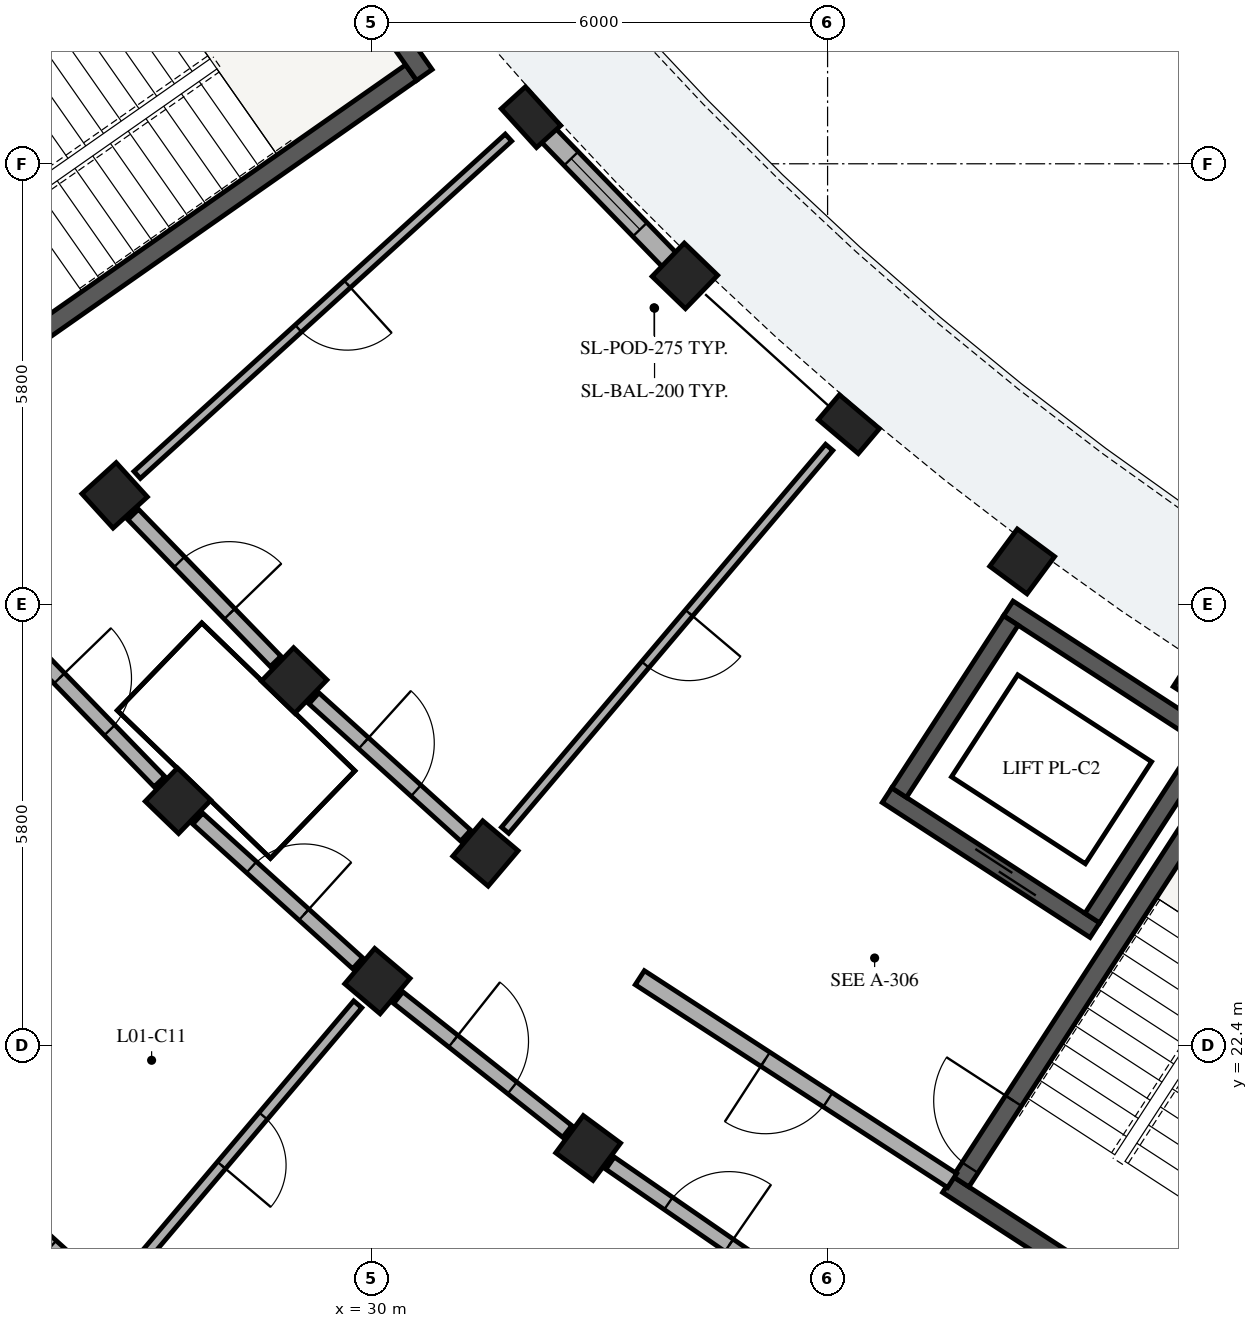
"""IFC4 building model, lengths in metres.
Left out: names, types, materials, properties, quantities, classifications, styles, units other than length and angle.
Written with IfcOpenShell. Run it as: python <this file> out.ifc"""

import sys

from ifc_helpers import new_model, si_unit, direction, frame, frame_2d, origin, origin_2d, place, context, subcontext, project, spatial, rectangle, extrude, element, fill, save


model = new_model("IFC4")
c1 = context("Model", 3, precision=1e-05, world=origin(), true_north=direction((0.0, 1.0)))
c2 = subcontext(c1, "Body", "Model", "MODEL_VIEW")
j1 = project(units=[si_unit("LENGTHUNIT", "METRE"), si_unit("PLANEANGLEUNIT", "RADIAN")], contexts=[c1])
p1 = place(None, origin())
s1 = spatial("IfcSite", under=j1, at=p1, CompositionType="ELEMENT")
p2 = place(p1, origin())
s2 = spatial("IfcBuilding", under=s1, at=p2, CompositionType="ELEMENT")
p3 = place(p2, frame((0.0, 0.0, 4.76)))
s3 = spatial("IfcBuildingStorey", under=s2, at=p3, CompositionType="ELEMENT", Elevation=4.76)
p4 = place(p3, frame((25.114, 31.414, 0.0), z_axis=(0.0, 0.0, 1.0), x_axis=(0.819141541656, 0.573591435374, 0.0)))
e1 = element("IfcWall", 1, at=p4, inside=s3, PredefinedType="SHEAR", context=c2, shape_type="SweptSolid", body=[
    extrude(rectangle(XDim=6.6, YDim=0.25, at=frame_2d((3.3, 0.0))), origin(), (0.0, 0.0, 1.0), 3.83),
])
p5 = place(p3, frame((30.695, 35.169, 0.0), z_axis=(0.0, 0.0, 1.0), x_axis=(-0.573582112484, 0.819148069789, 0.0)))
e2 = element("IfcWall", 2, at=p5, inside=s3, PredefinedType="SHEAR", context=c2, shape_type="SweptSolid", body=[
    extrude(rectangle(XDim=3.42, YDim=0.25, at=frame_2d((1.71, 0.0))), origin(), (0.0, 0.0, 1.0), 3.83),
])
p6 = place(p3, frame((23.296, 34.01, 0.0), z_axis=(0.0, 0.0, 1.0), x_axis=(0.819153711596, 0.573574055182, 0.0)))
e3 = element("IfcWall", 3, at=p6, inside=s3, PredefinedType="SHEAR", context=c2, shape_type="SweptSolid", body=[
    extrude(rectangle(XDim=6.6, YDim=0.25, at=frame_2d((3.3, 0.0))), origin(), (0.0, 0.0, 1.0), 3.83),
])
p7 = place(p6, frame((0.22, 0.0, 0.0)))
e4 = element("IfcOpeningElement", 4, at=p7, cuts=e3, PredefinedType="OPENING", context=c2, shape_type="SweptSolid", body=[
    extrude(rectangle(XDim=1.05, YDim=2.15, at=frame_2d((0.525, 1.075))), frame((0.0, 0.135, 0.0), z_axis=(0.0, -1.0, 0.0), x_axis=(1.0, 0.0, 0.0)), (0.0, 0.0, 1.0), 0.27),
])
p8 = place(p3, frame((40.413, 18.882, 0.0), z_axis=(0.0, 0.0, 1.0), x_axis=(0.544629435258, 0.838676802022, 0.0)))
e5 = element("IfcWall", 5, at=p8, inside=s3, PredefinedType="SHEAR", context=c2, shape_type="SweptSolid", body=[
    extrude(rectangle(XDim=6.6, YDim=0.25, at=frame_2d((3.3, 0.0))), origin(), (0.0, 0.0, 1.0), 3.83),
])
p9 = place(p3, frame((40.449, 18.709, 0.0), z_axis=(0.0, 0.0, 1.0), x_axis=(-0.838678407117, 0.544626963559, 0.0)))
e6 = element("IfcWall", 6, at=p9, inside=s3, PredefinedType="SHEAR", context=c2, shape_type="SweptSolid", body=[
    extrude(rectangle(XDim=3.42, YDim=0.25, at=frame_2d((1.71, 0.0))), origin(), (0.0, 0.0, 1.0), 3.83),
])
p10 = place(p3, frame((37.754, 20.608, 0.0), z_axis=(0.0, 0.0, 1.0), x_axis=(0.544655453679, 0.838659905312, 0.0)))
e7 = element("IfcWall", 7, at=p10, inside=s3, PredefinedType="SHEAR", context=c2, shape_type="SweptSolid", body=[
    extrude(rectangle(XDim=6.6, YDim=0.25, at=frame_2d((3.3, 0.0))), origin(), (0.0, 0.0, 1.0), 3.83),
])
p11 = place(p10, frame((0.22, 0.0, 0.0)))
e8 = element("IfcOpeningElement", 8, at=p11, cuts=e7, PredefinedType="OPENING", context=c2, shape_type="SweptSolid", body=[
    extrude(rectangle(XDim=1.05, YDim=2.15, at=frame_2d((0.525, 1.075))), frame((0.0, 0.135, 0.0), z_axis=(0.0, -1.0, 0.0), x_axis=(1.0, 0.0, 0.0)), (0.0, 0.0, 1.0), 0.27),
])
p12 = place(p3, frame((39.516, 23.917, 0.0), z_axis=(0.0, 0.0, 1.0), x_axis=(-0.838660840752, 0.544654013286, 0.0)))
e9 = element("IfcWall", 9, at=p12, inside=s3, PredefinedType="SHEAR", context=c2, shape_type="SweptSolid", body=[
    extrude(rectangle(XDim=3.26, YDim=0.23, at=frame_2d((1.63, 0.0))), origin(), (0.0, 0.0, 1.0), 3.83),
])
p13 = place(p12, frame((0.9, 0.0, 0.0)))
e10 = element("IfcOpeningElement", 10, at=p13, cuts=e9, PredefinedType="OPENING", context=c2, shape_type="SweptSolid", body=[
    extrude(rectangle(XDim=1.0, YDim=2.15, at=frame_2d((0.5, 1.075))), frame((0.0, 0.125, 0.0), z_axis=(0.0, -1.0, 0.0), x_axis=(1.0, 0.0, 0.0)), (0.0, 0.0, 1.0), 0.25),
])
p14 = place(p3, frame((41.112, 26.375, 0.0), z_axis=(0.0, 0.0, 1.0), x_axis=(-0.838638623546, 0.544688221919, 0.0)))
e11 = element("IfcWall", 11, at=p14, inside=s3, PredefinedType="SHEAR", context=c2, shape_type="SweptSolid", body=[
    extrude(rectangle(XDim=3.26, YDim=0.23, at=frame_2d((1.63, 0.0))), origin(), (0.0, 0.0, 1.0), 3.83),
])
p15 = place(p3, frame((39.482, 24.077, 0.0), z_axis=(0.0, 0.0, 1.0), x_axis=(0.544686387605, 0.838639814913, 0.0)))
e12 = element("IfcWall", 12, at=p15, inside=s3, PredefinedType="SHEAR", context=c2, shape_type="SweptSolid", body=[
    extrude(rectangle(XDim=2.7, YDim=0.23, at=frame_2d((1.35, 0.0))), origin(), (0.0, 0.0, 1.0), 3.83),
])
p16 = place(p3, frame((36.941, 25.727, 0.0), z_axis=(0.0, 0.0, 1.0), x_axis=(0.544622789439, 0.838681117722, 0.0)))
e13 = element("IfcWall", 13, at=p16, inside=s3, PredefinedType="SHEAR", context=c2, shape_type="SweptSolid", body=[
    extrude(rectangle(XDim=2.7, YDim=0.23, at=frame_2d((1.35, 0.0))), origin(), (0.0, 0.0, 1.0), 3.83),
])
p17 = place(p3, frame((32.097, 34.613, 0.0), z_axis=(0.0, 0.0, 1.0), x_axis=(-0.740218127487, -0.672366807435, 0.0)))
e14 = element("IfcColumn", 14, at=p17, inside=s3, PredefinedType="PILASTER", context=c2, shape_type="SweptSolid", body=[
    extrude(rectangle(XDim=0.43, YDim=0.69, at=origin_2d()), origin(), (0.0, 0.0, 1.0), 3.825),
])
for number, where, z_axis, x_axis in (
    (15, (26.62, 29.638, 0.0), (0.0, 0.0, 1.0), (-0.74, -0.672, 0.0)),
    (16, (34.122, 32.525, 0.0), (0.0, 0.0, 1.0), (-0.695, -0.719, 0.0)),
    (17, (28.982, 27.202, 0.0), (0.0, 0.0, 1.0), (-0.695, -0.719, 0.0)),
    (18, (27.454, 25.62, 0.0), (0.0, 0.0, 1.0), (-0.695, -0.719, 0.0)),
):
    element("IfcColumn", number, at=place(p3, frame(where, z_axis=z_axis, x_axis=x_axis)), inside=s3, PredefinedType="COLUMN", context=c2, shape_type="SweptSolid", body=[
        extrude(rectangle(XDim=0.61, YDim=0.61, at=origin_2d()), origin(), (0.0, 0.0, 1.0), 3.825),
    ])
p18 = place(p3, frame((36.28, 30.574, 0.0), z_axis=(0.0, 0.0, 1.0), x_axis=(-0.646123979643, -0.763232469783, 0.0)))
e19 = element("IfcColumn", 19, at=p18, inside=s3, PredefinedType="PILASTER", context=c2, shape_type="SweptSolid", body=[
    extrude(rectangle(XDim=0.43, YDim=0.69, at=origin_2d()), origin(), (0.0, 0.0, 1.0), 3.825),
])
for number, where, z_axis, x_axis in (
    (20, (31.499, 24.927, 0.0), (0.0, 0.0, 1.0), (-0.646, -0.763, 0.0)),
    (21, (30.077, 23.247, 0.0), (0.0, 0.0, 1.0), (-0.646, -0.763, 0.0)),
    (22, (38.56, 28.769, 0.0), (0.0, 0.0, 1.0), (-0.595, -0.804, 0.0)),
    (23, (32.85, 21.052, 0.0), (0.0, 0.0, 1.0), (-0.595, -0.804, 0.0)),
):
    element("IfcColumn", number, at=place(p3, frame(where, z_axis=z_axis, x_axis=x_axis)), inside=s3, PredefinedType="COLUMN", context=c2, shape_type="SweptSolid", body=[
        extrude(rectangle(XDim=0.61, YDim=0.61, at=origin_2d()), origin(), (0.0, 0.0, 1.0), 3.825),
    ])
p19 = place(p3, frame((40.954, 27.116, 0.0), z_axis=(0.0, 0.0, 1.0), x_axis=(-0.540974471368, -0.841039012964, 0.0)))
e24 = element("IfcColumn", 24, at=p19, inside=s3, PredefinedType="PILASTER", context=c2, shape_type="SweptSolid", body=[
    extrude(rectangle(XDim=0.43, YDim=0.69, at=origin_2d()), origin(), (0.0, 0.0, 1.0), 3.825),
])
p20 = place(p3, frame((32.226, 34.48, 0.0), z_axis=(0.0, 0.0, 1.0), x_axis=(0.696206559645, -0.717841505004, 0.0)))
e25 = element("IfcWall", 25, at=p20, inside=s3, PredefinedType="SOLIDWALL", context=c2, shape_type="SweptSolid", body=[
    extrude(rectangle(XDim=2.449, YDim=0.26, at=frame_2d((1.224, 0.0))), origin(), (0.0, 0.0, 1.0), 3.075),
])
p21 = place(p20, frame((0.574, 0.0, 0.55)))
e26 = element("IfcOpeningElement", 26, at=p21, cuts=e25, PredefinedType="OPENING", context=c2, shape_type="SweptSolid", body=[
    extrude(rectangle(XDim=1.3, YDim=1.6, at=frame_2d((0.65, 0.8))), frame((0.0, 0.14, 0.0), z_axis=(0.0, -1.0, 0.0), x_axis=(1.0, 0.0, 0.0)), (0.0, 0.0, 1.0), 0.28),
])
p22 = place(p3, frame((23.837, 21.479, 0.0), z_axis=(0.0, 0.0, 1.0), x_axis=(0.741699000924, -0.670732876806, 0.0)))
e27 = element("IfcWall", 27, at=p22, inside=s3, PredefinedType="SOLIDWALL", context=c2, shape_type="SweptSolid", body=[
    extrude(rectangle(XDim=3.437, YDim=0.26, at=frame_2d((1.718, 0.0))), origin(), (0.0, 0.0, 1.0), 3.075),
])
p23 = place(p22, frame((0.838, 0.0, 0.55)))
e28 = element("IfcOpeningElement", 28, at=p23, cuts=e27, PredefinedType="OPENING", context=c2, shape_type="SweptSolid", body=[
    extrude(rectangle(XDim=1.76, YDim=1.635, at=frame_2d((0.88, 0.817))), frame((0.0, 0.14, 0.0), z_axis=(0.0, -1.0, 0.0), x_axis=(1.0, 0.0, 0.0)), (0.0, 0.0, 1.0), 0.28),
])
p24 = place(p3, frame((37.639, 20.623, 0.0), z_axis=(0.0, 0.0, 1.0), x_axis=(-0.838681446513, 0.544622283124, 0.0)))
e29 = element("IfcWall", 29, at=p24, inside=s3, PredefinedType="PARTITIONING", context=c2, shape_type="SweptSolid", body=[
    extrude(rectangle(XDim=4.9, YDim=0.22, at=frame_2d((2.45, 0.0))), origin(), (0.0, 0.0, 1.0), 3.06),
])
p25 = place(p24, frame((1.95, 0.0, 0.0)))
e30 = element("IfcOpeningElement", 30, at=p25, cuts=e29, PredefinedType="OPENING", context=c2, shape_type="SweptSolid", body=[
    extrude(rectangle(XDim=0.98, YDim=2.14, at=frame_2d((0.49, 1.07))), frame((0.0, 0.12, 0.0), z_axis=(0.0, -1.0, 0.0), x_axis=(1.0, 0.0, 0.0)), (0.0, 0.0, 1.0), 0.24),
])
p26 = place(p3, frame((31.801, 34.344, 0.0), z_axis=(0.0, 0.0, 1.0), x_axis=(-0.74023124711, -0.672352363573, 0.0)))
e31 = element("IfcWall", 31, at=p26, inside=s3, PredefinedType="PARTITIONING", context=c2, shape_type="SweptSolid", body=[
    extrude(rectangle(XDim=6.6, YDim=0.125, at=frame_2d((3.3, 0.0))), origin(), (0.0, 0.0, 1.0), 3.09),
])
p27 = place(p26, frame((2.865, 0.0, 0.0)))
e32 = element("IfcOpeningElement", 32, at=p27, cuts=e31, PredefinedType="OPENING", context=c2, shape_type="SweptSolid", body=[
    extrude(rectangle(XDim=0.87, YDim=2.08, at=frame_2d((0.435, 1.04))), frame((0.0, 0.073, 0.0), z_axis=(0.0, -1.0, 0.0), x_axis=(1.0, 0.0, 0.0)), (0.0, 0.0, 1.0), 0.145),
])
p28 = place(p3, frame((25.235, 27.907, 0.0), z_axis=(0.0, 0.0, 1.0), x_axis=(0.696223786753, -0.717824796701, 0.0)))
e33 = element("IfcWall", 33, at=p28, inside=s3, PredefinedType="PARTITIONING", context=c2, shape_type="SweptSolid", body=[
    extrude(rectangle(XDim=2.837, YDim=0.195, at=frame_2d((1.418, 0.0))), origin(), (0.0, 0.0, 1.0), 3.09),
])
p29 = place(p28, frame((0.944, 0.0, 0.0)))
e34 = element("IfcOpeningElement", 34, at=p29, cuts=e33, PredefinedType="OPENING", context=c2, shape_type="SweptSolid", body=[
    extrude(rectangle(XDim=0.95, YDim=2.13, at=frame_2d((0.475, 1.065))), frame((0.0, 0.107, 0.0), z_axis=(0.0, -1.0, 0.0), x_axis=(1.0, 0.0, 0.0)), (0.0, 0.0, 1.0), 0.215),
])
p30 = place(p3, frame((26.863, 29.386, 0.0), z_axis=(0.0, 0.0, 1.0), x_axis=(0.696236443412, -0.717812520694, 0.0)))
e35 = element("IfcWall", 35, at=p30, inside=s3, PredefinedType="PARTITIONING", context=c2, shape_type="SweptSolid", body=[
    extrude(rectangle(XDim=2.693, YDim=0.195, at=frame_2d((1.347, 0.0))), origin(), (0.0, 0.0, 1.0), 3.09),
])
p31 = place(p30, frame((0.872, 0.0, 0.0)))
e36 = element("IfcOpeningElement", 36, at=p31, cuts=e35, PredefinedType="OPENING", context=c2, shape_type="SweptSolid", body=[
    extrude(rectangle(XDim=0.95, YDim=2.13, at=frame_2d((0.475, 1.065))), frame((0.0, 0.107, 0.0), z_axis=(0.0, -1.0, 0.0), x_axis=(1.0, 0.0, 0.0)), (0.0, 0.0, 1.0), 0.215),
])
p32 = place(p3, frame((27.713, 25.385, 0.0), z_axis=(0.0, 0.0, 1.0), x_axis=(0.741631592147, -0.670807410163, 0.0)))
e37 = element("IfcWall", 37, at=p32, inside=s3, PredefinedType="PARTITIONING", context=c2, shape_type="SweptSolid", body=[
    extrude(rectangle(XDim=2.837, YDim=0.195, at=frame_2d((1.418, 0.0))), origin(), (0.0, 0.0, 1.0), 3.09),
])
p33 = place(p32, frame((0.954, 0.0, 0.0)))
e38 = element("IfcOpeningElement", 38, at=p33, cuts=e37, PredefinedType="OPENING", context=c2, shape_type="SweptSolid", body=[
    extrude(rectangle(XDim=0.93, YDim=2.12, at=frame_2d((0.465, 1.06))), frame((0.0, 0.107, 0.0), z_axis=(0.0, -1.0, 0.0), x_axis=(1.0, 0.0, 0.0)), (0.0, 0.0, 1.0), 0.215),
])
p34 = place(p3, frame((29.241, 26.968, 0.0), z_axis=(0.0, 0.0, 1.0), x_axis=(0.74166462946, -0.670770882945, 0.0)))
e39 = element("IfcWall", 39, at=p34, inside=s3, PredefinedType="PARTITIONING", context=c2, shape_type="SweptSolid", body=[
    extrude(rectangle(XDim=2.693, YDim=0.195, at=frame_2d((1.347, 0.0))), origin(), (0.0, 0.0, 1.0), 3.09),
])
p35 = place(p34, frame((0.882, 0.0, 0.0)))
e40 = element("IfcOpeningElement", 40, at=p35, cuts=e39, PredefinedType="OPENING", context=c2, shape_type="SweptSolid", body=[
    extrude(rectangle(XDim=0.93, YDim=2.12, at=frame_2d((0.465, 1.06))), frame((0.0, 0.107, 0.0), z_axis=(0.0, -1.0, 0.0), x_axis=(1.0, 0.0, 0.0)), (0.0, 0.0, 1.0), 0.215),
])
p36 = place(p3, frame((29.819, 22.942, 0.0), z_axis=(0.0, 0.0, 1.0), x_axis=(-0.646137818229, -0.76322075434, 0.0)))
e41 = element("IfcWall", 41, at=p36, inside=s3, PredefinedType="PLUMBINGWALL", context=c2, shape_type="SweptSolid", body=[
    extrude(rectangle(XDim=4.7, YDim=0.14, at=frame_2d((2.35, 0.0))), origin(), (0.0, 0.0, 1.0), 3.09),
])
p37 = place(p36, frame((1.925, 0.0, 0.0)))
e42 = element("IfcOpeningElement", 42, at=p37, cuts=e41, PredefinedType="OPENING", context=c2, shape_type="SweptSolid", body=[
    extrude(rectangle(XDim=0.85, YDim=2.05, at=frame_2d((0.425, 1.025))), frame((0.0, 0.08, 0.0), z_axis=(0.0, -1.0, 0.0), x_axis=(1.0, 0.0, 0.0)), (0.0, 0.0, 1.0), 0.16),
])
p38 = place(p3, frame((36.021, 30.269, 0.0), z_axis=(0.0, 0.0, 1.0), x_axis=(-0.646121311019, -0.763234728932, 0.0)))
e43 = element("IfcWall", 43, at=p38, inside=s3, PredefinedType="PARTITIONING", context=c2, shape_type="SweptSolid", body=[
    extrude(rectangle(XDim=6.6, YDim=0.125, at=frame_2d((3.3, 0.0))), origin(), (0.0, 0.0, 1.0), 3.09),
])
p39 = place(p38, frame((2.855, 0.0, 0.0)))
e44 = element("IfcOpeningElement", 44, at=p39, cuts=e43, PredefinedType="OPENING", context=c2, shape_type="SweptSolid", body=[
    extrude(rectangle(XDim=0.89, YDim=2.1, at=frame_2d((0.445, 1.05))), frame((0.0, 0.073, 0.0), z_axis=(0.0, -1.0, 0.0), x_axis=(1.0, 0.0, 0.0)), (0.0, 0.0, 1.0), 0.145),
])
p40 = place(p3, frame((30.351, 23.03, 0.0), z_axis=(0.0, 0.0, 1.0), x_axis=(0.783965548427, -0.620804332201, 0.0)))
e45 = element("IfcWall", 45, at=p40, inside=s3, PredefinedType="PARTITIONING", context=c2, shape_type="SweptSolid", body=[
    extrude(rectangle(XDim=2.837, YDim=0.195, at=frame_2d((1.418, 0.0))), origin(), (0.0, 0.0, 1.0), 3.09),
])
p41 = place(p40, frame((0.924, 0.0, 0.0)))
e46 = element("IfcOpeningElement", 46, at=p41, cuts=e45, PredefinedType="OPENING", context=c2, shape_type="SweptSolid", body=[
    extrude(rectangle(XDim=0.99, YDim=2.16, at=frame_2d((0.495, 1.08))), frame((0.0, 0.107, 0.0), z_axis=(0.0, -1.0, 0.0), x_axis=(1.0, 0.0, 0.0)), (0.0, 0.0, 1.0), 0.215),
])
p42 = place(p3, frame((33.138, 20.853, 0.0), z_axis=(0.0, 0.0, 1.0), x_axis=(0.822870075235, -0.568229565653, 0.0)))
e47 = element("IfcWall", 47, at=p42, inside=s3, PredefinedType="PARTITIONING", context=c2, shape_type="SweptSolid", body=[
    extrude(rectangle(XDim=2.837, YDim=0.195, at=frame_2d((1.418, 0.0))), origin(), (0.0, 0.0, 1.0), 3.09),
])
p43 = place(p42, frame((0.934, 0.0, 0.0)))
e48 = element("IfcOpeningElement", 48, at=p43, cuts=e47, PredefinedType="OPENING", context=c2, shape_type="SweptSolid", body=[
    extrude(rectangle(XDim=0.97, YDim=2.15, at=frame_2d((0.485, 1.075))), frame((0.0, 0.107, 0.0), z_axis=(0.0, -1.0, 0.0), x_axis=(1.0, 0.0, 0.0)), (0.0, 0.0, 1.0), 0.215),
])
p44 = place(p21, origin())
e49 = element("IfcWindow", 49, at=p44, inside=s3, PartitioningType="SINGLE_PANEL", PredefinedType="WINDOW", context=c2, shape_type="SweptSolid", body=[
    extrude(rectangle(XDim=1.3, YDim=1.6, at=frame_2d((0.65, 0.8))), frame((0.0, 0.03, 0.0), z_axis=(0.0, -1.0, 0.0), x_axis=(1.0, 0.0, 0.0)), (0.0, 0.0, 1.0), 0.06),
])
fill(e26, e49)
p45 = place(p11, origin())
e50 = element("IfcDoor", 50, at=p45, inside=s3, OperationType="SINGLE_SWING_RIGHT", PredefinedType="DOOR", context=c2, shape_type="SweptSolid", body=[
    extrude(rectangle(XDim=1.05, YDim=2.15, at=frame_2d((0.525, 1.075))), frame((0.0, 0.025, 0.0), z_axis=(0.0, -1.0, 0.0), x_axis=(1.0, 0.0, 0.0)), (0.0, 0.0, 1.0), 0.05),
])
fill(e8, e50)
p46 = place(p13, origin())
e51 = element("IfcDoor", 51, at=p46, inside=s3, OperationType="DOUBLE_DOOR_SLIDING", PredefinedType="DOOR", context=c2, shape_type="SweptSolid", body=[
    extrude(rectangle(XDim=1.0, YDim=2.15, at=frame_2d((0.5, 1.075))), frame((0.0, 0.025, 0.0), z_axis=(0.0, -1.0, 0.0), x_axis=(1.0, 0.0, 0.0)), (0.0, 0.0, 1.0), 0.05),
])
fill(e10, e51)
p47 = place(p25, origin())
e52 = element("IfcDoor", 52, at=p47, inside=s3, OperationType="SINGLE_SWING_RIGHT", PredefinedType="DOOR", context=c2, shape_type="SweptSolid", body=[
    extrude(rectangle(XDim=0.98, YDim=2.14, at=frame_2d((0.49, 1.07))), frame((0.0, 0.025, 0.0), z_axis=(0.0, -1.0, 0.0), x_axis=(1.0, 0.0, 0.0)), (0.0, 0.0, 1.0), 0.05),
])
fill(e30, e52)
p48 = place(p27, origin())
e53 = element("IfcDoor", 53, at=p48, inside=s3, OperationType="SINGLE_SWING_LEFT", PredefinedType="DOOR", context=c2, shape_type="SweptSolid", body=[
    extrude(rectangle(XDim=0.87, YDim=2.08, at=frame_2d((0.435, 1.04))), frame((0.0, 0.025, 0.0), z_axis=(0.0, -1.0, 0.0), x_axis=(1.0, 0.0, 0.0)), (0.0, 0.0, 1.0), 0.05),
])
fill(e32, e53)
p49 = place(p29, origin())
e54 = element("IfcDoor", 54, at=p49, inside=s3, OperationType="SINGLE_SWING_LEFT", PredefinedType="DOOR", context=c2, shape_type="SweptSolid", body=[
    extrude(rectangle(XDim=0.95, YDim=2.13, at=frame_2d((0.475, 1.065))), frame((0.0, 0.025, 0.0), z_axis=(0.0, -1.0, 0.0), x_axis=(1.0, 0.0, 0.0)), (0.0, 0.0, 1.0), 0.05),
])
fill(e34, e54)
p50 = place(p31, origin())
e55 = element("IfcDoor", 55, at=p50, inside=s3, OperationType="SINGLE_SWING_RIGHT", PredefinedType="DOOR", context=c2, shape_type="SweptSolid", body=[
    extrude(rectangle(XDim=0.95, YDim=2.13, at=frame_2d((0.475, 1.065))), frame((0.0, 0.025, 0.0), z_axis=(0.0, -1.0, 0.0), x_axis=(1.0, 0.0, 0.0)), (0.0, 0.0, 1.0), 0.05),
])
fill(e36, e55)
p51 = place(p33, origin())
e56 = element("IfcDoor", 56, at=p51, inside=s3, OperationType="SINGLE_SWING_RIGHT", PredefinedType="DOOR", context=c2, shape_type="SweptSolid", body=[
    extrude(rectangle(XDim=0.93, YDim=2.12, at=frame_2d((0.465, 1.06))), frame((0.0, 0.025, 0.0), z_axis=(0.0, -1.0, 0.0), x_axis=(1.0, 0.0, 0.0)), (0.0, 0.0, 1.0), 0.05),
])
fill(e38, e56)
p52 = place(p35, origin())
e57 = element("IfcDoor", 57, at=p52, inside=s3, OperationType="SINGLE_SWING_LEFT", PredefinedType="DOOR", context=c2, shape_type="SweptSolid", body=[
    extrude(rectangle(XDim=0.93, YDim=2.12, at=frame_2d((0.465, 1.06))), frame((0.0, 0.025, 0.0), z_axis=(0.0, -1.0, 0.0), x_axis=(1.0, 0.0, 0.0)), (0.0, 0.0, 1.0), 0.05),
])
fill(e40, e57)
p53 = place(p37, origin())
e58 = element("IfcDoor", 58, at=p53, inside=s3, OperationType="SINGLE_SWING_RIGHT", PredefinedType="DOOR", context=c2, shape_type="SweptSolid", body=[
    extrude(rectangle(XDim=0.85, YDim=2.05, at=frame_2d((0.425, 1.025))), frame((0.0, 0.025, 0.0), z_axis=(0.0, -1.0, 0.0), x_axis=(1.0, 0.0, 0.0)), (0.0, 0.0, 1.0), 0.05),
])
fill(e42, e58)
p54 = place(p39, origin())
e59 = element("IfcDoor", 59, at=p54, inside=s3, OperationType="SINGLE_SWING_LEFT", PredefinedType="DOOR", context=c2, shape_type="SweptSolid", body=[
    extrude(rectangle(XDim=0.89, YDim=2.1, at=frame_2d((0.445, 1.05))), frame((0.0, 0.025, 0.0), z_axis=(0.0, -1.0, 0.0), x_axis=(1.0, 0.0, 0.0)), (0.0, 0.0, 1.0), 0.05),
])
fill(e44, e59)
p55 = place(p41, origin())
e60 = element("IfcDoor", 60, at=p55, inside=s3, OperationType="SINGLE_SWING_LEFT", PredefinedType="DOOR", context=c2, shape_type="SweptSolid", body=[
    extrude(rectangle(XDim=0.99, YDim=2.16, at=frame_2d((0.495, 1.08))), frame((0.0, 0.025, 0.0), z_axis=(0.0, -1.0, 0.0), x_axis=(1.0, 0.0, 0.0)), (0.0, 0.0, 1.0), 0.05),
])
fill(e46, e60)
p56 = place(p43, origin())
e61 = element("IfcDoor", 61, at=p56, inside=s3, OperationType="SINGLE_SWING_RIGHT", PredefinedType="DOOR", context=c2, shape_type="SweptSolid", body=[
    extrude(rectangle(XDim=0.97, YDim=2.15, at=frame_2d((0.485, 1.075))), frame((0.0, 0.025, 0.0), z_axis=(0.0, -1.0, 0.0), x_axis=(1.0, 0.0, 0.0)), (0.0, 0.0, 1.0), 0.05),
])
fill(e48, e61)
save(model, sys.argv[1])
